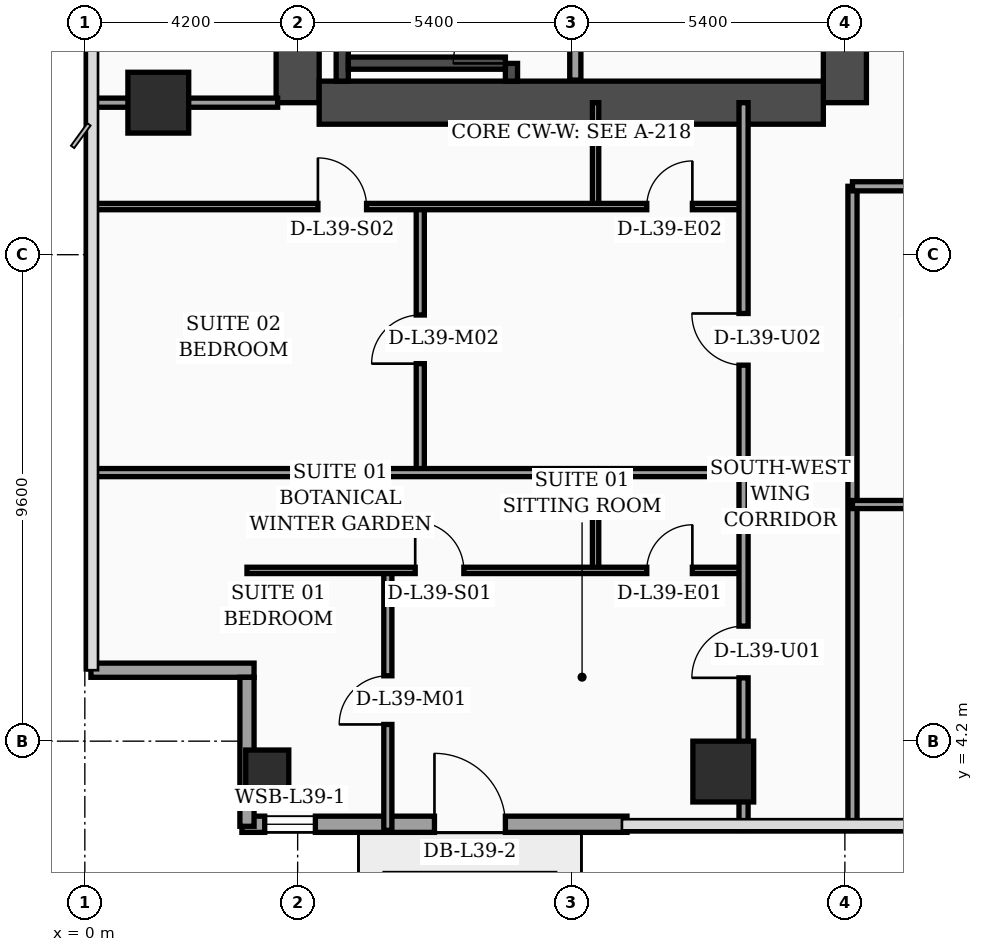
"""IFC4 building model, lengths in metres.
Left out: names, types, materials, properties, quantities, classifications, styles, units other than length and angle.
Written with IfcOpenShell. Run it as: python <this file> out.ifc"""

import sys

from ifc_helpers import new_model, si_unit, direction, frame, frame_2d, origin, origin_2d, place, context, subcontext, project, spatial, rectangle, hollow_rectangle, extrude, element, fill, save


model = new_model("IFC4")
c1 = context("Model", 3, precision=1e-05, world=origin(), true_north=direction((0.0, 1.0)))
c2 = subcontext(c1, "Body", "Model", "MODEL_VIEW")
j1 = project(units=[si_unit("LENGTHUNIT", "METRE"), si_unit("PLANEANGLEUNIT", "RADIAN")], contexts=[c1])
p1 = place(None, origin())
s1 = spatial("IfcSite", under=j1, at=p1, CompositionType="ELEMENT")
p2 = place(p1, origin())
s2 = spatial("IfcBuilding", under=s1, at=p2, CompositionType="ELEMENT")
p3 = place(p2, frame((0.0, 0.0, 159.9)))
s3 = spatial("IfcBuildingStorey", under=s2, at=p3, CompositionType="ELEMENT", Elevation=159.9)
p4 = place(p3, frame((4.2, 16.8, 0.0), z_axis=(0.0, 0.0, 1.0), x_axis=(0.0, 1.0, 0.0)))
e1 = element("IfcWall", 1, at=p4, inside=s3, PredefinedType="SHEAR", context=c2, shape_type="SweptSolid", body=[
    extrude(rectangle(XDim=21.6, YDim=0.85, at=frame_2d((10.8, 0.0))), origin(), (0.0, 0.0, 1.0), 3.56),
])
p5 = place(p3, frame((15.0, 16.8, 0.0), z_axis=(0.0, 0.0, 1.0), x_axis=(0.0, 1.0, 0.0)))
e2 = element("IfcWall", 2, at=p5, inside=s3, PredefinedType="SHEAR", context=c2, shape_type="SweptSolid", body=[
    extrude(rectangle(XDim=21.6, YDim=0.85, at=frame_2d((10.8, 0.0))), origin(), (0.0, 0.0, 1.0), 3.56),
])
p6 = place(p5, frame((8.65, 0.0, 0.0)))
e3 = element("IfcOpeningElement", 3, at=p6, cuts=e2, PredefinedType="OPENING", context=c2, shape_type="SweptSolid", body=[
    extrude(rectangle(XDim=1.1, YDim=2.2, at=frame_2d((0.55, 1.1))), frame((0.0, 0.435, 0.0), z_axis=(0.0, -1.0, 0.0), x_axis=(1.0, 0.0, 0.0)), (0.0, 0.0, 1.0), 0.87),
])
p7 = place(p5, frame((10.85, 0.0, 0.0)))
e4 = element("IfcOpeningElement", 4, at=p7, cuts=e2, PredefinedType="OPENING", context=c2, shape_type="SweptSolid", body=[
    extrude(rectangle(XDim=1.1, YDim=2.2, at=frame_2d((0.55, 1.1))), frame((0.0, 0.435, 0.0), z_axis=(0.0, -1.0, 0.0), x_axis=(1.0, 0.0, 0.0)), (0.0, 0.0, 1.0), 0.87),
])
p8 = place(p5, frame((13.5, 0.0, 0.0)))
e5 = element("IfcOpeningElement", 5, at=p8, cuts=e2, PredefinedType="OPENING", context=c2, shape_type="SweptSolid", body=[
    extrude(rectangle(XDim=1.1, YDim=2.2, at=frame_2d((0.55, 1.1))), frame((0.0, 0.435, 0.0), z_axis=(0.0, -1.0, 0.0), x_axis=(1.0, 0.0, 0.0)), (0.0, 0.0, 1.0), 0.87),
])
p9 = place(p5, frame((16.15, 0.0, 0.0)))
e6 = element("IfcOpeningElement", 6, at=p9, cuts=e2, PredefinedType="OPENING", context=c2, shape_type="SweptSolid", body=[
    extrude(rectangle(XDim=1.1, YDim=2.2, at=frame_2d((0.55, 1.1))), frame((0.0, 0.435, 0.0), z_axis=(0.0, -1.0, 0.0), x_axis=(1.0, 0.0, 0.0)), (0.0, 0.0, 1.0), 0.87),
])
p10 = place(p3, frame((4.625, 16.8, 0.0), z_axis=(0.0, 0.0, 1.0), x_axis=(1.0, 0.0, 0.0)))
e7 = element("IfcWall", 7, at=p10, inside=s3, PredefinedType="SHEAR", context=c2, shape_type="SweptSolid", body=[
    extrude(rectangle(XDim=9.95, YDim=0.85, at=frame_2d((4.975, 0.0))), origin(), (0.0, 0.0, 1.0), 3.56),
])
p11 = place(p3, frame((5.08, 17.225, 0.0), z_axis=(0.0, 0.0, 1.0), x_axis=(0.0, 1.0, 0.0)))
e8 = element("IfcWall", 8, at=p11, inside=s3, PredefinedType="SOLIDWALL", context=c2, shape_type="SweptSolid", body=[
    extrude(rectangle(XDim=9.565, YDim=0.24, at=frame_2d((4.782, 0.0))), origin(), (0.0, 0.0, 1.0), 3.56),
])
p12 = place(p3, frame((8.42, 17.225, 0.0), z_axis=(0.0, 0.0, 1.0), x_axis=(0.0, 1.0, 0.0)))
e9 = element("IfcWall", 9, at=p12, inside=s3, PredefinedType="SOLIDWALL", context=c2, shape_type="SweptSolid", body=[
    extrude(rectangle(XDim=9.565, YDim=0.24, at=frame_2d((4.782, 0.0))), origin(), (0.0, 0.0, 1.0), 3.56),
])
p13 = place(p12, frame((0.35, 0.0, 0.0)))
e10 = element("IfcOpeningElement", 10, at=p13, cuts=e9, PredefinedType="OPENING", context=c2, shape_type="SweptSolid", body=[
    extrude(rectangle(XDim=1.15, YDim=2.2, at=frame_2d((0.575, 1.1))), frame((0.0, 0.13, 0.0), z_axis=(0.0, -1.0, 0.0), x_axis=(1.0, 0.0, 0.0)), (0.0, 0.0, 1.0), 0.26),
])
p14 = place(p3, frame((5.2, 17.58, 0.0), z_axis=(0.0, 0.0, 1.0), x_axis=(1.0, 0.0, 0.0)))
e11 = element("IfcWall", 11, at=p14, inside=s3, PredefinedType="SOLIDWALL", context=c2, shape_type="SweptSolid", body=[
    extrude(rectangle(XDim=3.1, YDim=0.24, at=frame_2d((1.55, 0.0))), origin(), (0.0, 0.0, 1.0), 3.56),
])
p15 = place(p3, frame((3.6, 3.6, 0.0), z_axis=(0.0, 0.0, 1.0), x_axis=(1.0, 0.0, 0.0)))
e12 = element("IfcColumn", 12, at=p15, inside=s3, PredefinedType="COLUMN", context=c2, shape_type="SweptSolid", body=[
    extrude(hollow_rectangle(XDim=0.85, YDim=0.85, WallThickness=0.036, at=origin_2d()), origin(), (0.0, 0.0, 1.0), 3.56),
])
for number, where, z_axis, x_axis in (
    (13, (1.45, 16.8, 0.0), (0.0, 0.0, 1.0), (1.0, 0.0, 0.0)),
    (14, (12.6, 3.6, 0.0), (0.0, 0.0, 1.0), (1.0, 0.0, 0.0)),
):
    element("IfcColumn", number, at=place(p3, frame(where, z_axis=z_axis, x_axis=x_axis)), inside=s3, PredefinedType="COLUMN", context=c2, shape_type="SweptSolid", body=[
        extrude(rectangle(XDim=1.2, YDim=1.2, at=origin_2d()), origin(), (0.0, 0.0, 1.0), 3.56),
    ])
p16 = place(p3, frame((3.1, 2.56, 0.0), z_axis=(0.0, 0.0, 1.0), x_axis=(1.0, 0.0, 0.0)))
e15 = element("IfcWall", 15, at=p16, inside=s3, PredefinedType="SOLIDWALL", context=c2, shape_type="SweptSolid", body=[
    extrude(rectangle(XDim=7.6, YDim=0.32, at=frame_2d((3.8, 0.0))), origin(), (0.0, 0.0, 1.0), 3.56),
])
p17 = place(p16, frame((0.45, 0.0, 0.75)))
e16 = element("IfcOpeningElement", 16, at=p17, cuts=e15, PredefinedType="OPENING", context=c2, shape_type="SweptSolid", body=[
    extrude(rectangle(XDim=1.0, YDim=1.6, at=frame_2d((0.5, 0.8))), frame((0.0, 0.17, 0.0), z_axis=(0.0, -1.0, 0.0), x_axis=(1.0, 0.0, 0.0)), (0.0, 0.0, 1.0), 0.34),
])
p18 = place(p16, frame((3.8, 0.0, 0.0)))
e17 = element("IfcOpeningElement", 17, at=p18, cuts=e15, PredefinedType="OPENING", context=c2, shape_type="SweptSolid", body=[
    extrude(rectangle(XDim=1.4, YDim=2.25, at=frame_2d((0.7, 1.125))), frame((0.0, 0.17, 0.0), z_axis=(0.0, -1.0, 0.0), x_axis=(1.0, 0.0, 0.0)), (0.0, 0.0, 1.0), 0.34),
])
p19 = place(p3, frame((0.12, 5.6, 0.0), z_axis=(0.0, 0.0, 1.0), x_axis=(1.0, 0.0, 0.0)))
e18 = element("IfcWall", 18, at=p19, inside=s3, PredefinedType="SOLIDWALL", context=c2, shape_type="SweptSolid", body=[
    extrude(rectangle(XDim=3.22, YDim=0.28, at=frame_2d((1.61, 0.0))), origin(), (0.0, 0.0, 1.0), 2.94),
])
p20 = place(p3, frame((3.2, 5.46, 0.0), z_axis=(0.0, 0.0, 1.0), x_axis=(0.0, -1.0, 0.0)))
e19 = element("IfcWall", 19, at=p20, inside=s3, PredefinedType="SOLIDWALL", context=c2, shape_type="SweptSolid", body=[
    extrude(rectangle(XDim=2.94, YDim=0.28, at=frame_2d((1.47, 0.0))), origin(), (0.0, 0.0, 1.0), 2.94),
])
p21 = place(p3, frame((9.68, 17.245, 0.0), z_axis=(0.0, 0.0, 1.0), x_axis=(0.0, 1.0, 0.0)))
e20 = element("IfcWall", 20, at=p21, inside=s3, PredefinedType="SOLIDWALL", context=c2, shape_type="SweptSolid", body=[
    extrude(rectangle(XDim=7.755, YDim=0.22, at=frame_2d((3.877, 0.0))), origin(), (0.0, 0.0, 1.0), 3.56),
])
p22 = place(p3, frame((0.08, 16.8, 0.0), z_axis=(0.0, 0.0, 1.0), x_axis=(1.0, 0.0, 0.0)))
e21 = element("IfcWall", 21, at=p22, inside=s3, PredefinedType="PARTITIONING", context=c2, shape_type="SweptSolid", body=[
    extrude(rectangle(XDim=3.725, YDim=0.18, at=frame_2d((1.862, 0.0))), origin(), (0.0, 0.0, 1.0), 2.94),
])
p23 = place(p3, frame((10.08, 7.57, 0.0), z_axis=(0.0, 0.0, 1.0), x_axis=(0.0, 1.0, 0.0)))
e22 = element("IfcWall", 22, at=p23, inside=s3, PredefinedType="PARTITIONING", context=c2, shape_type="SweptSolid", body=[
    extrude(rectangle(XDim=1.93, YDim=0.125, at=frame_2d((0.965, 0.0))), origin(), (0.0, 0.0, 1.0), 3.09),
])
p24 = place(p3, frame((5.98, 2.44, 0.0), z_axis=(0.0, 0.0, 1.0), x_axis=(0.0, 1.0, 0.0)))
e23 = element("IfcWall", 23, at=p24, inside=s3, PredefinedType="PARTITIONING", context=c2, shape_type="SweptSolid", body=[
    extrude(rectangle(XDim=5.13, YDim=0.16, at=frame_2d((2.565, 0.0))), origin(), (0.0, 0.0, 1.0), 3.04),
])
p25 = place(p24, frame((2.09, 0.0, 0.0)))
e24 = element("IfcOpeningElement", 24, at=p25, cuts=e23, PredefinedType="OPENING", context=c2, shape_type="SweptSolid", body=[
    extrude(rectangle(XDim=0.96, YDim=2.2, at=frame_2d((0.48, 1.1))), frame((0.0, 0.09, 0.0), z_axis=(0.0, -1.0, 0.0), x_axis=(1.0, 0.0, 0.0)), (0.0, 0.0, 1.0), 0.18),
])
p26 = place(p3, frame((3.2, 7.57, 0.0), z_axis=(0.0, 0.0, 1.0), x_axis=(1.0, 0.0, 0.0)))
e25 = element("IfcWall", 25, at=p26, inside=s3, PredefinedType="PARTITIONING", context=c2, shape_type="SweptSolid", body=[
    extrude(rectangle(XDim=9.8, YDim=0.125, at=frame_2d((4.9, 0.0))), origin(), (0.0, 0.0, 1.0), 2.94),
])
p27 = place(p26, frame((3.32, 0.0, 0.0)))
e26 = element("IfcOpeningElement", 26, at=p27, cuts=e25, PredefinedType="OPENING", context=c2, shape_type="SweptSolid", body=[
    extrude(rectangle(XDim=0.96, YDim=2.2, at=frame_2d((0.48, 1.1))), frame((0.0, 0.073, 0.0), z_axis=(0.0, -1.0, 0.0), x_axis=(1.0, 0.0, 0.0)), (0.0, 0.0, 1.0), 0.145),
])
p28 = place(p26, frame((7.89, 0.0, 0.0)))
e27 = element("IfcOpeningElement", 27, at=p28, cuts=e25, PredefinedType="OPENING", context=c2, shape_type="SweptSolid", body=[
    extrude(rectangle(XDim=0.9, YDim=2.15, at=frame_2d((0.45, 1.075))), frame((0.0, 0.073, 0.0), z_axis=(0.0, -1.0, 0.0), x_axis=(1.0, 0.0, 0.0)), (0.0, 0.0, 1.0), 0.145),
])
p29 = place(p3, frame((10.08, 14.75, 0.0), z_axis=(0.0, 0.0, 1.0), x_axis=(0.0, 1.0, 0.0)))
e28 = element("IfcWall", 28, at=p29, inside=s3, PredefinedType="PARTITIONING", context=c2, shape_type="SweptSolid", body=[
    extrude(rectangle(XDim=2.05, YDim=0.125, at=frame_2d((1.025, 0.0))), origin(), (0.0, 0.0, 1.0), 3.56),
])
p30 = place(p3, frame((6.62, 9.5, 0.0), z_axis=(0.0, 0.0, 1.0), x_axis=(0.0, 1.0, 0.0)))
e29 = element("IfcWall", 29, at=p30, inside=s3, PredefinedType="PARTITIONING", context=c2, shape_type="SweptSolid", body=[
    extrude(rectangle(XDim=5.25, YDim=0.16, at=frame_2d((2.625, 0.0))), origin(), (0.0, 0.0, 1.0), 3.14),
])
p31 = place(p30, frame((2.15, 0.0, 0.0)))
e30 = element("IfcOpeningElement", 30, at=p31, cuts=e29, PredefinedType="OPENING", context=c2, shape_type="SweptSolid", body=[
    extrude(rectangle(XDim=0.96, YDim=2.2, at=frame_2d((0.48, 1.1))), frame((0.0, 0.09, 0.0), z_axis=(0.0, -1.0, 0.0), x_axis=(1.0, 0.0, 0.0)), (0.0, 0.0, 1.0), 0.18),
])
p32 = place(p3, frame((0.08, 14.75, 0.0), z_axis=(0.0, 0.0, 1.0), x_axis=(1.0, 0.0, 0.0)))
e31 = element("IfcWall", 31, at=p32, inside=s3, PredefinedType="PARTITIONING", context=c2, shape_type="SweptSolid", body=[
    extrude(rectangle(XDim=12.92, YDim=0.125, at=frame_2d((6.46, 0.0))), origin(), (0.0, 0.0, 1.0), 2.94),
])
p33 = place(p32, frame((4.52, 0.0, 0.0)))
e32 = element("IfcOpeningElement", 32, at=p33, cuts=e31, PredefinedType="OPENING", context=c2, shape_type="SweptSolid", body=[
    extrude(rectangle(XDim=0.96, YDim=2.2, at=frame_2d((0.48, 1.1))), frame((0.0, 0.073, 0.0), z_axis=(0.0, -1.0, 0.0), x_axis=(1.0, 0.0, 0.0)), (0.0, 0.0, 1.0), 0.145),
])
p34 = place(p32, frame((11.01, 0.0, 0.0)))
e33 = element("IfcOpeningElement", 33, at=p34, cuts=e31, PredefinedType="OPENING", context=c2, shape_type="SweptSolid", body=[
    extrude(rectangle(XDim=0.9, YDim=2.15, at=frame_2d((0.45, 1.075))), frame((0.0, 0.073, 0.0), z_axis=(0.0, -1.0, 0.0), x_axis=(1.0, 0.0, 0.0)), (0.0, 0.0, 1.0), 0.145),
])
p35 = place(p3, frame((0.08, 9.5, 0.0), z_axis=(0.0, 0.0, 1.0), x_axis=(1.0, 0.0, 0.0)))
e34 = element("IfcWall", 34, at=p35, inside=s3, PredefinedType="PARTITIONING", context=c2, shape_type="SweptSolid", body=[
    extrude(rectangle(XDim=12.92, YDim=0.16, at=frame_2d((6.46, 0.0))), origin(), (0.0, 0.0, 1.0), 2.94),
])
p36 = place(p3, frame((13.0, 2.44, 0.0), z_axis=(0.0, 0.0, 1.0), x_axis=(0.0, 1.0, 0.0)))
e35 = element("IfcWall", 35, at=p36, inside=s3, PredefinedType="PARTITIONING", context=c2, shape_type="SweptSolid", body=[
    extrude(rectangle(XDim=14.36, YDim=0.18, at=frame_2d((7.18, 0.0))), origin(), (0.0, 0.0, 1.0), 2.94),
])
p37 = place(p36, frame((3.01, 0.0, 0.0)))
e36 = element("IfcOpeningElement", 36, at=p37, cuts=e35, PredefinedType="OPENING", context=c2, shape_type="SweptSolid", body=[
    extrude(rectangle(XDim=1.02, YDim=2.2, at=frame_2d((0.51, 1.1))), frame((0.0, 0.1, 0.0), z_axis=(0.0, -1.0, 0.0), x_axis=(1.0, 0.0, 0.0)), (0.0, 0.0, 1.0), 0.2),
])
p38 = place(p36, frame((9.18, 0.0, 0.0)))
e37 = element("IfcOpeningElement", 37, at=p38, cuts=e35, PredefinedType="OPENING", context=c2, shape_type="SweptSolid", body=[
    extrude(rectangle(XDim=1.02, YDim=2.2, at=frame_2d((0.51, 1.1))), frame((0.0, 0.1, 0.0), z_axis=(0.0, -1.0, 0.0), x_axis=(1.0, 0.0, 0.0)), (0.0, 0.0, 1.0), 0.2),
])
p39 = place(p3, frame((15.15, 2.44, 0.0), z_axis=(0.0, 0.0, 1.0), x_axis=(0.0, 1.0, 0.0)))
e38 = element("IfcWall", 38, at=p39, inside=s3, PredefinedType="PARTITIONING", context=c2, shape_type="SweptSolid", body=[
    extrude(rectangle(XDim=12.71, YDim=0.18, at=frame_2d((6.355, 0.0))), origin(), (0.0, 0.0, 1.0), 3.04),
])
p40 = place(p3, frame((15.15, 8.87, 0.0), z_axis=(0.0, 0.0, 1.0), x_axis=(1.0, 0.0, 0.0)))
e39 = element("IfcWall", 39, at=p40, inside=s3, PredefinedType="PARTITIONING", context=c2, shape_type="SweptSolid", body=[
    extrude(rectangle(XDim=4.45, YDim=0.16, at=frame_2d((2.225, 0.0))), origin(), (0.0, 0.0, 1.0), 3.56),
])
p41 = place(p40, frame((1.75, 0.0, 0.0)))
e40 = element("IfcOpeningElement", 40, at=p41, cuts=e39, PredefinedType="OPENING", context=c2, shape_type="SweptSolid", body=[
    extrude(rectangle(XDim=0.96, YDim=2.2, at=frame_2d((0.48, 1.1))), frame((0.0, 0.09, 0.0), z_axis=(0.0, -1.0, 0.0), x_axis=(1.0, 0.0, 0.0)), (0.0, 0.0, 1.0), 0.18),
])
p42 = place(p3, frame((15.15, 15.15, 0.0), z_axis=(0.0, 0.0, 1.0), x_axis=(1.0, 0.0, 0.0)))
e41 = element("IfcWall", 41, at=p42, inside=s3, PredefinedType="PARTITIONING", context=c2, shape_type="SweptSolid", body=[
    extrude(rectangle(XDim=6.45, YDim=0.18, at=frame_2d((3.225, 0.0))), origin(), (0.0, 0.0, 1.0), 2.49),
])
p43 = place(p42, frame((1.74, 0.0, 0.0)))
e42 = element("IfcOpeningElement", 42, at=p43, cuts=e41, PredefinedType="OPENING", context=c2, shape_type="SweptSolid", body=[
    extrude(rectangle(XDim=1.02, YDim=2.2, at=frame_2d((0.51, 1.1))), frame((0.0, 0.1, 0.0), z_axis=(0.0, -1.0, 0.0), x_axis=(1.0, 0.0, 0.0)), (0.0, 0.0, 1.0), 0.2),
])
p44 = place(p17, origin())
e43 = element("IfcWindow", 43, at=p44, inside=s3, PartitioningType="SINGLE_PANEL", PredefinedType="WINDOW", context=c2, shape_type="SweptSolid", body=[
    extrude(rectangle(XDim=1.0, YDim=1.6, at=frame_2d((0.5, 0.8))), frame((0.0, 0.03, 0.0), z_axis=(0.0, -1.0, 0.0), x_axis=(1.0, 0.0, 0.0)), (0.0, 0.0, 1.0), 0.06),
])
fill(e16, e43)
p45 = place(p18, origin())
e44 = element("IfcDoor", 44, at=p45, inside=s3, OperationType="SINGLE_SWING_LEFT", PredefinedType="DOOR", context=c2, shape_type="SweptSolid", body=[
    extrude(rectangle(XDim=1.4, YDim=2.25, at=frame_2d((0.7, 1.125))), frame((0.0, 0.025, 0.0), z_axis=(0.0, -1.0, 0.0), x_axis=(1.0, 0.0, 0.0)), (0.0, 0.0, 1.0), 0.05),
])
fill(e17, e44)
p46 = place(p25, origin())
e45 = element("IfcDoor", 45, at=p46, inside=s3, OperationType="SINGLE_SWING_LEFT", PredefinedType="DOOR", context=c2, shape_type="SweptSolid", body=[
    extrude(rectangle(XDim=0.96, YDim=2.2, at=frame_2d((0.48, 1.1))), frame((0.0, 0.025, 0.0), z_axis=(0.0, -1.0, 0.0), x_axis=(1.0, 0.0, 0.0)), (0.0, 0.0, 1.0), 0.05),
])
fill(e24, e45)
p47 = place(p27, origin())
e46 = element("IfcDoor", 46, at=p47, inside=s3, OperationType="SINGLE_SWING_LEFT", PredefinedType="DOOR", context=c2, shape_type="SweptSolid", body=[
    extrude(rectangle(XDim=0.96, YDim=2.2, at=frame_2d((0.48, 1.1))), frame((0.0, 0.025, 0.0), z_axis=(0.0, -1.0, 0.0), x_axis=(1.0, 0.0, 0.0)), (0.0, 0.0, 1.0), 0.05),
])
fill(e26, e46)
p48 = place(p28, origin())
e47 = element("IfcDoor", 47, at=p48, inside=s3, OperationType="SINGLE_SWING_RIGHT", PredefinedType="DOOR", context=c2, shape_type="SweptSolid", body=[
    extrude(rectangle(XDim=0.9, YDim=2.15, at=frame_2d((0.45, 1.075))), frame((0.0, 0.025, 0.0), z_axis=(0.0, -1.0, 0.0), x_axis=(1.0, 0.0, 0.0)), (0.0, 0.0, 1.0), 0.05),
])
fill(e27, e47)
p49 = place(p31, origin())
e48 = element("IfcDoor", 48, at=p49, inside=s3, OperationType="SINGLE_SWING_LEFT", PredefinedType="DOOR", context=c2, shape_type="SweptSolid", body=[
    extrude(rectangle(XDim=0.96, YDim=2.2, at=frame_2d((0.48, 1.1))), frame((0.0, 0.025, 0.0), z_axis=(0.0, -1.0, 0.0), x_axis=(1.0, 0.0, 0.0)), (0.0, 0.0, 1.0), 0.05),
])
fill(e30, e48)
p50 = place(p33, origin())
e49 = element("IfcDoor", 49, at=p50, inside=s3, OperationType="SINGLE_SWING_LEFT", PredefinedType="DOOR", context=c2, shape_type="SweptSolid", body=[
    extrude(rectangle(XDim=0.96, YDim=2.2, at=frame_2d((0.48, 1.1))), frame((0.0, 0.025, 0.0), z_axis=(0.0, -1.0, 0.0), x_axis=(1.0, 0.0, 0.0)), (0.0, 0.0, 1.0), 0.05),
])
fill(e32, e49)
p51 = place(p34, origin())
e50 = element("IfcDoor", 50, at=p51, inside=s3, OperationType="SINGLE_SWING_RIGHT", PredefinedType="DOOR", context=c2, shape_type="SweptSolid", body=[
    extrude(rectangle(XDim=0.9, YDim=2.15, at=frame_2d((0.45, 1.075))), frame((0.0, 0.025, 0.0), z_axis=(0.0, -1.0, 0.0), x_axis=(1.0, 0.0, 0.0)), (0.0, 0.0, 1.0), 0.05),
])
fill(e33, e50)
p52 = place(p37, origin())
e51 = element("IfcDoor", 51, at=p52, inside=s3, OperationType="SINGLE_SWING_LEFT", PredefinedType="DOOR", context=c2, shape_type="SweptSolid", body=[
    extrude(rectangle(XDim=1.02, YDim=2.2, at=frame_2d((0.51, 1.1))), frame((0.0, 0.025, 0.0), z_axis=(0.0, -1.0, 0.0), x_axis=(1.0, 0.0, 0.0)), (0.0, 0.0, 1.0), 0.05),
])
fill(e36, e51)
p53 = place(p38, origin())
e52 = element("IfcDoor", 52, at=p53, inside=s3, OperationType="SINGLE_SWING_RIGHT", PredefinedType="DOOR", context=c2, shape_type="SweptSolid", body=[
    extrude(rectangle(XDim=1.02, YDim=2.2, at=frame_2d((0.51, 1.1))), frame((0.0, 0.025, 0.0), z_axis=(0.0, -1.0, 0.0), x_axis=(1.0, 0.0, 0.0)), (0.0, 0.0, 1.0), 0.05),
])
fill(e37, e52)
p54 = place(p13, origin())
e53 = element("IfcDoor", 53, at=p54, inside=s3, OperationType="SINGLE_SWING_LEFT", PredefinedType="DOOR", context=c2, shape_type="SweptSolid", body=[
    extrude(rectangle(XDim=1.15, YDim=2.2, at=frame_2d((0.575, 1.1))), frame((0.0, 0.025, 0.0), z_axis=(0.0, -1.0, 0.0), x_axis=(1.0, 0.0, 0.0)), (0.0, 0.0, 1.0), 0.05),
])
fill(e10, e53)
save(model, sys.argv[1])
